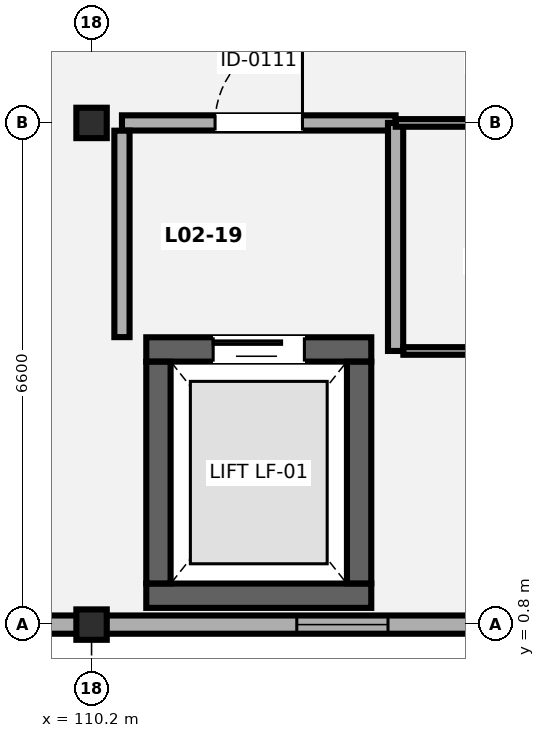
"""IFC4 building model, lengths in metres.
Left out: names, types, materials, properties, quantities, classifications, styles, units other than length and angle.
Written with IfcOpenShell. Run it as: python <this file> out.ifc"""

import sys

from ifc_helpers import new_model, si_unit, direction, frame, frame_2d, origin, origin_2d, place, context, subcontext, project, spatial, rectangle, i_section, extrude, element, fill, save


model = new_model("IFC4")
c1 = context("Model", 3, precision=1e-05, world=origin(), true_north=direction((0.0, 1.0)))
c2 = subcontext(c1, "Body", "Model", "MODEL_VIEW")
j1 = project(units=[si_unit("LENGTHUNIT", "METRE"), si_unit("PLANEANGLEUNIT", "RADIAN")], contexts=[c1])
p1 = place(None, origin())
s1 = spatial("IfcSite", under=j1, at=p1, CompositionType="ELEMENT")
p2 = place(p1, origin())
s2 = spatial("IfcBuilding", under=s1, at=p2, CompositionType="ELEMENT")
p3 = place(p2, frame((0.0, 0.0, 9.1)))
s3 = spatial("IfcBuildingStorey", under=s2, at=p3, CompositionType="ELEMENT", Elevation=9.1)
for number, where, z_axis, x_axis in (
    (1, (110.2, 0.8, 0.0), (0.0, 0.0, 1.0), (1.0, 0.0, 0.0)),
    (2, (110.2, 7.4, 0.0), (0.0, 0.0, 1.0), (1.0, 0.0, 0.0)),
):
    element("IfcColumn", number, at=place(p3, frame(where, z_axis=z_axis, x_axis=x_axis)), inside=s3, PredefinedType="COLUMN", context=c2, shape_type="SweptSolid", body=[
        extrude(i_section(OverallWidth=0.4, OverallDepth=0.4, WebThickness=0.02, FlangeThickness=0.035, FilletRadius=0.016, at=origin_2d()), origin(), (0.0, 0.0, 1.0), 4.2),
    ])
p4 = place(p3, frame((162.002, 0.8, 0.0), z_axis=(0.0, 0.0, 1.0), x_axis=(-1.0, 0.0, 0.0)))
e3 = element("IfcWall", 3, at=p4, inside=s3, PredefinedType="SOLIDWALL", context=c2, shape_type="SweptSolid", body=[
    extrude(rectangle(XDim=58.204, YDim=0.24, at=frame_2d((29.102, 0.0))), origin(), (0.0, 0.0, 1.0), 3.505),
])
p5 = place(p4, frame((53.877, 0.0, 0.85)))
e4 = element("IfcOpeningElement", 4, at=p5, cuts=e3, PredefinedType="OPENING", context=c2, shape_type="SweptSolid", body=[
    extrude(rectangle(XDim=2.45, YDim=1.4, at=frame_2d((1.225, 0.7))), frame((0.0, 0.13, 0.0), z_axis=(0.0, -1.0, 0.0), x_axis=(1.0, 0.0, 0.0)), (0.0, 0.0, 1.0), 0.26),
])
p6 = place(p4, frame((47.902, 0.0, 0.85)))
e5 = element("IfcOpeningElement", 5, at=p6, cuts=e3, PredefinedType="OPENING", context=c2, shape_type="SweptSolid", body=[
    extrude(rectangle(XDim=1.2, YDim=1.25, at=frame_2d((0.6, 0.625))), frame((0.0, 0.13, 0.0), z_axis=(0.0, -1.0, 0.0), x_axis=(1.0, 0.0, 0.0)), (0.0, 0.0, 1.0), 0.26),
])
p7 = place(p4, frame((41.177, 0.0, 0.85)))
e6 = element("IfcOpeningElement", 6, at=p7, cuts=e3, PredefinedType="OPENING", context=c2, shape_type="SweptSolid", body=[
    extrude(rectangle(XDim=1.45, YDim=1.25, at=frame_2d((0.725, 0.625))), frame((0.0, 0.13, 0.0), z_axis=(0.0, -1.0, 0.0), x_axis=(1.0, 0.0, 0.0)), (0.0, 0.0, 1.0), 0.26),
])
p8 = place(p4, frame((34.477, 0.0, 0.85)))
e7 = element("IfcOpeningElement", 7, at=p8, cuts=e3, PredefinedType="OPENING", context=c2, shape_type="SweptSolid", body=[
    extrude(rectangle(XDim=1.65, YDim=1.25, at=frame_2d((0.825, 0.625))), frame((0.0, 0.13, 0.0), z_axis=(0.0, -1.0, 0.0), x_axis=(1.0, 0.0, 0.0)), (0.0, 0.0, 1.0), 0.26),
])
p9 = place(p4, frame((27.752, 0.0, 0.85)))
e8 = element("IfcOpeningElement", 8, at=p9, cuts=e3, PredefinedType="OPENING", context=c2, shape_type="SweptSolid", body=[
    extrude(rectangle(XDim=1.9, YDim=1.25, at=frame_2d((0.95, 0.625))), frame((0.0, 0.13, 0.0), z_axis=(0.0, -1.0, 0.0), x_axis=(1.0, 0.0, 0.0)), (0.0, 0.0, 1.0), 0.26),
])
p10 = place(p4, frame((21.002, 0.0, 0.85)))
e9 = element("IfcOpeningElement", 9, at=p10, cuts=e3, PredefinedType="OPENING", context=c2, shape_type="SweptSolid", body=[
    extrude(rectangle(XDim=2.2, YDim=1.25, at=frame_2d((1.1, 0.625))), frame((0.0, 0.13, 0.0), z_axis=(0.0, -1.0, 0.0), x_axis=(1.0, 0.0, 0.0)), (0.0, 0.0, 1.0), 0.26),
])
p11 = place(p4, frame((14.252, 0.0, 0.85)))
e10 = element("IfcOpeningElement", 10, at=p11, cuts=e3, PredefinedType="OPENING", context=c2, shape_type="SweptSolid", body=[
    extrude(rectangle(XDim=2.5, YDim=1.25, at=frame_2d((1.25, 0.625))), frame((0.0, 0.13, 0.0), z_axis=(0.0, -1.0, 0.0), x_axis=(1.0, 0.0, 0.0)), (0.0, 0.0, 1.0), 0.26),
])
p12 = place(p4, frame((8.452, 0.0, 0.85)))
e11 = element("IfcOpeningElement", 11, at=p12, cuts=e3, PredefinedType="OPENING", context=c2, shape_type="SweptSolid", body=[
    extrude(rectangle(XDim=0.9, YDim=1.35, at=frame_2d((0.45, 0.675))), frame((0.0, 0.13, 0.0), z_axis=(0.0, -1.0, 0.0), x_axis=(1.0, 0.0, 0.0)), (0.0, 0.0, 1.0), 0.26),
])
p13 = place(p4, frame((2.177, 0.0, 0.85)))
e12 = element("IfcOpeningElement", 12, at=p13, cuts=e3, PredefinedType="OPENING", context=c2, shape_type="SweptSolid", body=[
    extrude(rectangle(XDim=1.05, YDim=1.35, at=frame_2d((0.525, 0.675))), frame((0.0, 0.13, 0.0), z_axis=(0.0, -1.0, 0.0), x_axis=(1.0, 0.0, 0.0)), (0.0, 0.0, 1.0), 0.26),
])
p14 = place(p3, frame((110.92, 1.18, 0.0), z_axis=(0.0, 0.0, 1.0), x_axis=(1.0, 0.0, 0.0)))
e13 = element("IfcWall", 13, at=p14, inside=s3, PredefinedType="SHEAR", context=c2, shape_type="SweptSolid", body=[
    extrude(rectangle(XDim=2.96, YDim=0.32, at=frame_2d((1.48, 0.0))), origin(), (0.0, 0.0, 1.0), 4.02),
])
p15 = place(p3, frame((110.92, 4.42, 0.0), z_axis=(0.0, 0.0, 1.0), x_axis=(1.0, 0.0, 0.0)))
e14 = element("IfcWall", 14, at=p15, inside=s3, PredefinedType="SHEAR", context=c2, shape_type="SweptSolid", body=[
    extrude(rectangle(XDim=2.96, YDim=0.32, at=frame_2d((1.48, 0.0))), origin(), (0.0, 0.0, 1.0), 4.02),
])
p16 = place(p15, frame((0.88, 0.0, 0.0)))
e15 = element("IfcOpeningElement", 15, at=p16, cuts=e14, PredefinedType="OPENING", context=c2, shape_type="SweptSolid", body=[
    extrude(rectangle(XDim=1.2, YDim=2.2, at=frame_2d((0.6, 1.1))), frame((0.0, 0.17, 0.0), z_axis=(0.0, -1.0, 0.0), x_axis=(1.0, 0.0, 0.0)), (0.0, 0.0, 1.0), 0.34),
])
for number, where, z_axis, x_axis in (
    (16, (111.08, 1.342, 0.0), (0.0, 0.0, 1.0), (0.0, 1.0, 0.0)),
    (17, (113.72, 1.342, 0.0), (0.0, 0.0, 1.0), (0.0, 1.0, 0.0)),
):
    element("IfcWall", number, at=place(p3, frame(where, z_axis=z_axis, x_axis=x_axis)), inside=s3, PredefinedType="SHEAR", context=c2, shape_type="SweptSolid", body=[
        extrude(rectangle(XDim=2.916, YDim=0.32, at=frame_2d((1.458, 0.0))), origin(), (0.0, 0.0, 1.0), 4.02),
    ])
p17 = place(p3, frame((110.6, 7.4, 0.0), z_axis=(0.0, 0.0, 1.0), x_axis=(1.0, 0.0, 0.0)))
e18 = element("IfcWall", 18, at=p17, inside=s3, PredefinedType="SOLIDWALL", context=c2, shape_type="SweptSolid", body=[
    extrude(rectangle(XDim=3.6, YDim=0.2, at=frame_2d((1.8, 0.0))), origin(), (0.0, 0.0, 1.0), 3.293),
])
p18 = place(p17, frame((1.225, 0.0, 0.0)))
e19 = element("IfcOpeningElement", 19, at=p18, cuts=e18, PredefinedType="OPENING", context=c2, shape_type="SweptSolid", body=[
    extrude(rectangle(XDim=1.15, YDim=2.15, at=frame_2d((0.575, 1.075))), frame((0.0, 0.11, 0.0), z_axis=(0.0, -1.0, 0.0), x_axis=(1.0, 0.0, 0.0)), (0.0, 0.0, 1.0), 0.22),
])
p19 = place(p3, frame((110.6, 4.582, 0.0), z_axis=(0.0, 0.0, 1.0), x_axis=(0.0, 1.0, 0.0)))
e20 = element("IfcWall", 20, at=p19, inside=s3, PredefinedType="SOLIDWALL", context=c2, shape_type="SweptSolid", body=[
    extrude(rectangle(XDim=2.716, YDim=0.2, at=frame_2d((1.358, 0.0))), origin(), (0.0, 0.0, 1.0), 4.02),
])
p20 = place(p3, frame((114.2, 4.4, 0.0), z_axis=(0.0, 0.0, 1.0), x_axis=(0.0, 1.0, 0.0)))
e21 = element("IfcWall", 21, at=p20, inside=s3, PredefinedType="SOLIDWALL", context=c2, shape_type="SweptSolid", body=[
    extrude(rectangle(XDim=3.0, YDim=0.2, at=frame_2d((1.5, 0.0))), origin(), (0.0, 0.0, 1.0), 4.02),
])
p21 = place(p3, frame((114.302, 4.4, 0.0), z_axis=(0.0, 0.0, 1.0), x_axis=(1.0, 0.0, 0.0)))
e22 = element("IfcWall", 22, at=p21, inside=s3, PredefinedType="PARTITIONING", context=c2, shape_type="SweptSolid", body=[
    extrude(rectangle(XDim=2.798, YDim=0.1, at=frame_2d((1.399, 0.0))), origin(), (0.0, 0.0, 1.0), 4.02),
])
p22 = place(p3, frame((114.202, 7.4, 0.0), z_axis=(0.0, 0.0, 1.0), x_axis=(1.0, 0.0, 0.0)))
e23 = element("IfcWall", 23, at=p22, inside=s3, PredefinedType="PARTITIONING", context=c2, shape_type="SweptSolid", body=[
    extrude(rectangle(XDim=2.898, YDim=0.1, at=frame_2d((1.449, 0.0))), origin(), (0.0, 0.0, 1.0), 3.293),
])
p23 = place(p22, frame((0.949, 0.0, 0.0)))
e24 = element("IfcOpeningElement", 24, at=p23, cuts=e23, PredefinedType="OPENING", context=c2, shape_type="SweptSolid", body=[
    extrude(rectangle(XDim=1.0, YDim=2.1, at=frame_2d((0.5, 1.05))), frame((0.0, 0.06, 0.0), z_axis=(0.0, -1.0, 0.0), x_axis=(1.0, 0.0, 0.0)), (0.0, 0.0, 1.0), 0.12),
])
p24 = place(p6, origin())
e25 = element("IfcWindow", 25, at=p24, inside=s3, PartitioningType="SINGLE_PANEL", PredefinedType="WINDOW", context=c2, shape_type="SweptSolid", body=[
    extrude(rectangle(XDim=1.2, YDim=1.25, at=frame_2d((0.6, 0.625))), frame((0.0, 0.03, 0.0), z_axis=(0.0, -1.0, 0.0), x_axis=(1.0, 0.0, 0.0)), (0.0, 0.0, 1.0), 0.06),
])
fill(e5, e25)
p25 = place(p16, origin())
e26 = element("IfcDoor", 26, at=p25, inside=s3, OperationType="SLIDING_TO_LEFT", PredefinedType="DOOR", context=c2, shape_type="SweptSolid", body=[
    extrude(rectangle(XDim=1.2, YDim=2.2, at=frame_2d((0.6, 1.1))), frame((0.0, 0.025, 0.0), z_axis=(0.0, -1.0, 0.0), x_axis=(1.0, 0.0, 0.0)), (0.0, 0.0, 1.0), 0.05),
])
fill(e15, e26)
p26 = place(p18, origin())
e27 = element("IfcDoor", 27, at=p26, inside=s3, OperationType="SINGLE_SWING_RIGHT", PredefinedType="DOOR", context=c2, shape_type="SweptSolid", body=[
    extrude(rectangle(XDim=1.15, YDim=2.15, at=frame_2d((0.575, 1.075))), frame((0.0, 0.025, 0.0), z_axis=(0.0, -1.0, 0.0), x_axis=(1.0, 0.0, 0.0)), (0.0, 0.0, 1.0), 0.05),
])
fill(e19, e27)
save(model, sys.argv[1])
